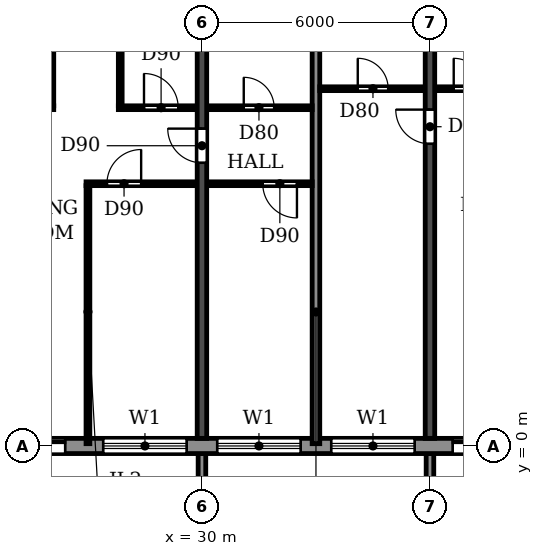
"""IFC4 building model, lengths in metres.
Left out: names, types, materials, properties, quantities, classifications, styles, units other than length and angle.
Written with IfcOpenShell. Run it as: python <this file> out.ifc"""

import sys

from ifc_helpers import new_model, si_unit, direction, frame, frame_2d, origin, place, context, subcontext, project, spatial, polyline, rectangle, outline, extrude, source, transform, mapped, element, fill, save


model = new_model("IFC4")
c1 = context("Model", 3, precision=1e-05, world=origin(), true_north=direction((0.0, 1.0)))
c2 = subcontext(c1, "Body", "Model", "MODEL_VIEW")
j1 = project(units=[si_unit("LENGTHUNIT", "METRE"), si_unit("PLANEANGLEUNIT", "RADIAN")], contexts=[c1])
p1 = place(None, origin())
s1 = spatial("IfcSite", under=j1, at=p1, CompositionType="ELEMENT")
p2 = place(p1, origin())
s2 = spatial("IfcBuilding", under=s1, at=p2, CompositionType="ELEMENT")
p3 = place(p2, frame((0.0, 0.0, 208.2)))
s3 = spatial("IfcBuildingStorey", under=s2, at=p3, CompositionType="ELEMENT", Elevation=208.2)
p4 = place(p3, frame((30.0, 0.2, 0.0), z_axis=(0.0, 0.0, 1.0), x_axis=(0.0, 1.0, 0.0)))
e1 = element("IfcWall", 1, at=p4, inside=s3, PredefinedType="SHEAR", context=c2, shape_type="SweptSolid", body=[
    extrude(rectangle(XDim=11.7, YDim=0.25, at=frame_2d((5.85, 0.0))), origin(), (0.0, 0.0, 1.0), 3.0),
])
p5 = place(p4, frame((7.25, 0.0, 0.0)))
e2 = element("IfcOpeningElement", 2, at=p5, cuts=e1, PredefinedType="OPENING", context=c2, shape_type="SweptSolid", body=[
    extrude(rectangle(XDim=0.9, YDim=2.1, at=frame_2d((0.45, 1.05))), frame((0.0, 0.135, 0.0), z_axis=(0.0, -1.0, 0.0), x_axis=(1.0, 0.0, 0.0)), (0.0, 0.0, 1.0), 0.27),
])
p6 = place(p3, frame((36.0, 0.2, 0.0), z_axis=(0.0, 0.0, 1.0), x_axis=(0.0, 1.0, 0.0)))
e3 = element("IfcWall", 3, at=p6, inside=s3, PredefinedType="SHEAR", context=c2, shape_type="SweptSolid", body=[
    extrude(rectangle(XDim=11.7, YDim=0.25, at=frame_2d((5.85, 0.0))), origin(), (0.0, 0.0, 1.0), 3.0),
])
p7 = place(p6, frame((7.75, 0.0, 0.0)))
e4 = element("IfcOpeningElement", 4, at=p7, cuts=e3, PredefinedType="OPENING", context=c2, shape_type="SweptSolid", body=[
    extrude(rectangle(XDim=0.9, YDim=2.1, at=frame_2d((0.45, 1.05))), frame((0.0, 0.135, 0.0), z_axis=(0.0, -1.0, 0.0), x_axis=(1.0, 0.0, 0.0)), (0.0, 0.0, 1.0), 0.27),
])
p8 = place(p3, frame((22.683, 0.0, 0.0), z_axis=(0.0, 0.0, 1.0), x_axis=(1.0, 0.0, 0.0)))
e5 = element("IfcWall", 5, at=p8, inside=s3, PredefinedType="STANDARD", context=c2, shape_type="SweptSolid", body=[
    extrude(rectangle(XDim=56.634, YDim=0.4, at=frame_2d((28.317, 0.0))), origin(), (0.0, 0.0, 1.0), 3.0),
])
p9 = place(p8, frame((1.917, 0.0, 0.0)))
e6 = element("IfcOpeningElement", 6, at=p9, cuts=e5, PredefinedType="OPENING", context=c2, shape_type="SweptSolid", body=[
    extrude(rectangle(XDim=1.8, YDim=2.4, at=frame_2d((0.9, 1.2))), frame((0.0, 0.21, 0.0), z_axis=(0.0, -1.0, 0.0), x_axis=(1.0, 0.0, 0.0)), (0.0, 0.0, 1.0), 0.42),
])
p10 = place(p8, frame((4.717, 0.0, 0.9)))
e7 = element("IfcOpeningElement", 7, at=p10, cuts=e5, PredefinedType="OPENING", context=c2, shape_type="SweptSolid", body=[
    extrude(rectangle(XDim=2.2, YDim=1.5, at=frame_2d((1.1, 0.75))), frame((0.0, 0.21, 0.0), z_axis=(0.0, -1.0, 0.0), x_axis=(1.0, 0.0, 0.0)), (0.0, 0.0, 1.0), 0.42),
])
p11 = place(p8, frame((7.717, 0.0, 0.9)))
e8 = element("IfcOpeningElement", 8, at=p11, cuts=e5, PredefinedType="OPENING", context=c2, shape_type="SweptSolid", body=[
    extrude(rectangle(XDim=2.2, YDim=1.5, at=frame_2d((1.1, 0.75))), frame((0.0, 0.21, 0.0), z_axis=(0.0, -1.0, 0.0), x_axis=(1.0, 0.0, 0.0)), (0.0, 0.0, 1.0), 0.42),
])
p12 = place(p8, frame((10.717, 0.0, 0.9)))
e9 = element("IfcOpeningElement", 9, at=p12, cuts=e5, PredefinedType="OPENING", context=c2, shape_type="SweptSolid", body=[
    extrude(rectangle(XDim=2.2, YDim=1.5, at=frame_2d((1.1, 0.75))), frame((0.0, 0.21, 0.0), z_axis=(0.0, -1.0, 0.0), x_axis=(1.0, 0.0, 0.0)), (0.0, 0.0, 1.0), 0.42),
])
p13 = place(p8, frame((13.917, 0.0, 0.0)))
e10 = element("IfcOpeningElement", 10, at=p13, cuts=e5, PredefinedType="OPENING", context=c2, shape_type="SweptSolid", body=[
    extrude(rectangle(XDim=1.8, YDim=2.4, at=frame_2d((0.9, 1.2))), frame((0.0, 0.21, 0.0), z_axis=(0.0, -1.0, 0.0), x_axis=(1.0, 0.0, 0.0)), (0.0, 0.0, 1.0), 0.42),
])
p14 = place(p8, frame((16.717, 0.0, 0.9)))
e11 = element("IfcOpeningElement", 11, at=p14, cuts=e5, PredefinedType="OPENING", context=c2, shape_type="SweptSolid", body=[
    extrude(rectangle(XDim=2.2, YDim=1.5, at=frame_2d((1.1, 0.75))), frame((0.0, 0.21, 0.0), z_axis=(0.0, -1.0, 0.0), x_axis=(1.0, 0.0, 0.0)), (0.0, 0.0, 1.0), 0.42),
])
p15 = place(p8, frame((19.717, 0.0, 0.9)))
e12 = element("IfcOpeningElement", 12, at=p15, cuts=e5, PredefinedType="OPENING", context=c2, shape_type="SweptSolid", body=[
    extrude(rectangle(XDim=2.2, YDim=1.5, at=frame_2d((1.1, 0.75))), frame((0.0, 0.21, 0.0), z_axis=(0.0, -1.0, 0.0), x_axis=(1.0, 0.0, 0.0)), (0.0, 0.0, 1.0), 0.42),
])
p16 = place(p8, frame((22.717, 0.0, 0.9)))
e13 = element("IfcOpeningElement", 13, at=p16, cuts=e5, PredefinedType="OPENING", context=c2, shape_type="SweptSolid", body=[
    extrude(rectangle(XDim=2.2, YDim=1.5, at=frame_2d((1.1, 0.75))), frame((0.0, 0.21, 0.0), z_axis=(0.0, -1.0, 0.0), x_axis=(1.0, 0.0, 0.0)), (0.0, 0.0, 1.0), 0.42),
])
p17 = place(p8, frame((25.917, 0.0, 0.0)))
e14 = element("IfcOpeningElement", 14, at=p17, cuts=e5, PredefinedType="OPENING", context=c2, shape_type="SweptSolid", body=[
    extrude(rectangle(XDim=1.8, YDim=2.4, at=frame_2d((0.9, 1.2))), frame((0.0, 0.21, 0.0), z_axis=(0.0, -1.0, 0.0), x_axis=(1.0, 0.0, 0.0)), (0.0, 0.0, 1.0), 0.42),
])
p18 = place(p8, frame((28.717, 0.0, 0.9)))
e15 = element("IfcOpeningElement", 15, at=p18, cuts=e5, PredefinedType="OPENING", context=c2, shape_type="SweptSolid", body=[
    extrude(rectangle(XDim=2.2, YDim=1.5, at=frame_2d((1.1, 0.75))), frame((0.0, 0.21, 0.0), z_axis=(0.0, -1.0, 0.0), x_axis=(1.0, 0.0, 0.0)), (0.0, 0.0, 1.0), 0.42),
])
p19 = place(p8, frame((31.717, 0.0, 0.9)))
e16 = element("IfcOpeningElement", 16, at=p19, cuts=e5, PredefinedType="OPENING", context=c2, shape_type="SweptSolid", body=[
    extrude(rectangle(XDim=2.2, YDim=1.5, at=frame_2d((1.1, 0.75))), frame((0.0, 0.21, 0.0), z_axis=(0.0, -1.0, 0.0), x_axis=(1.0, 0.0, 0.0)), (0.0, 0.0, 1.0), 0.42),
])
p20 = place(p8, frame((34.717, 0.0, 0.9)))
e17 = element("IfcOpeningElement", 17, at=p20, cuts=e5, PredefinedType="OPENING", context=c2, shape_type="SweptSolid", body=[
    extrude(rectangle(XDim=2.2, YDim=1.5, at=frame_2d((1.1, 0.75))), frame((0.0, 0.21, 0.0), z_axis=(0.0, -1.0, 0.0), x_axis=(1.0, 0.0, 0.0)), (0.0, 0.0, 1.0), 0.42),
])
p21 = place(p8, frame((37.717, 0.0, 0.9)))
e18 = element("IfcOpeningElement", 18, at=p21, cuts=e5, PredefinedType="OPENING", context=c2, shape_type="SweptSolid", body=[
    extrude(rectangle(XDim=2.2, YDim=1.5, at=frame_2d((1.1, 0.75))), frame((0.0, 0.21, 0.0), z_axis=(0.0, -1.0, 0.0), x_axis=(1.0, 0.0, 0.0)), (0.0, 0.0, 1.0), 0.42),
])
p22 = place(p8, frame((40.717, 0.0, 0.9)))
e19 = element("IfcOpeningElement", 19, at=p22, cuts=e5, PredefinedType="OPENING", context=c2, shape_type="SweptSolid", body=[
    extrude(rectangle(XDim=2.2, YDim=1.5, at=frame_2d((1.1, 0.75))), frame((0.0, 0.21, 0.0), z_axis=(0.0, -1.0, 0.0), x_axis=(1.0, 0.0, 0.0)), (0.0, 0.0, 1.0), 0.42),
])
p23 = place(p8, frame((43.717, 0.0, 0.9)))
e20 = element("IfcOpeningElement", 20, at=p23, cuts=e5, PredefinedType="OPENING", context=c2, shape_type="SweptSolid", body=[
    extrude(rectangle(XDim=2.2, YDim=1.5, at=frame_2d((1.1, 0.75))), frame((0.0, 0.21, 0.0), z_axis=(0.0, -1.0, 0.0), x_axis=(1.0, 0.0, 0.0)), (0.0, 0.0, 1.0), 0.42),
])
p24 = place(p8, frame((46.717, 0.0, 0.9)))
e21 = element("IfcOpeningElement", 21, at=p24, cuts=e5, PredefinedType="OPENING", context=c2, shape_type="SweptSolid", body=[
    extrude(rectangle(XDim=2.2, YDim=1.5, at=frame_2d((1.1, 0.75))), frame((0.0, 0.21, 0.0), z_axis=(0.0, -1.0, 0.0), x_axis=(1.0, 0.0, 0.0)), (0.0, 0.0, 1.0), 0.42),
])
p25 = place(p8, frame((49.717, 0.0, 0.9)))
e22 = element("IfcOpeningElement", 22, at=p25, cuts=e5, PredefinedType="OPENING", context=c2, shape_type="SweptSolid", body=[
    extrude(rectangle(XDim=2.2, YDim=1.5, at=frame_2d((1.1, 0.75))), frame((0.0, 0.21, 0.0), z_axis=(0.0, -1.0, 0.0), x_axis=(1.0, 0.0, 0.0)), (0.0, 0.0, 1.0), 0.42),
])
p26 = place(p8, frame((52.917, 0.0, 0.0)))
e23 = element("IfcOpeningElement", 23, at=p26, cuts=e5, PredefinedType="OPENING", context=c2, shape_type="SweptSolid", body=[
    extrude(rectangle(XDim=1.8, YDim=2.4, at=frame_2d((0.9, 1.2))), frame((0.0, 0.21, 0.0), z_axis=(0.0, -1.0, 0.0), x_axis=(1.0, 0.0, 0.0)), (0.0, 0.0, 1.0), 0.42),
])
m1 = source(origin(), c2, "Body", "SweptSolid", [
    extrude(outline(polyline([(0.0, 0.0), (0.2, 0.0), (0.2, 1.65), (0.0, 1.65), (0.0, 0.0)])), origin(), (0.0, 0.0, 1.0), 3.1),
])
for number, where in (
    (24, (29.9, -1.85, 0.0)),
    (25, (35.9, -1.85, 0.0)),
):
    element("IfcWall", number, at=place(p3, frame(where)), inside=s3, PredefinedType="STANDARD", context=c2, shape_type="MappedRepresentation", body=[
        mapped(m1, transform((0.0, 0.0, 0.0))),
    ])
p27 = place(p3, frame((33.0, 0.06, 0.0), z_axis=(0.0, 0.0, 1.0), x_axis=(0.0, 1.0, 0.0)))
e26 = element("IfcWall", 26, at=p27, inside=s3, PredefinedType="PARTITIONING", context=c2, shape_type="SweptSolid", body=[
    extrude(rectangle(XDim=11.83, YDim=0.2, at=frame_2d((5.915, 0.0))), origin(), (0.0, 0.0, 1.0), 3.0),
])
p28 = place(p3, frame((26.95, 6.9, 0.0), z_axis=(0.0, 0.0, 1.0), x_axis=(1.0, 0.0, 0.0)))
e27 = element("IfcWall", 27, at=p28, inside=s3, PredefinedType="PARTITIONING", context=c2, shape_type="SweptSolid", body=[
    extrude(rectangle(XDim=2.915, YDim=0.1, at=frame_2d((1.458, 0.0))), origin(), (0.0, 0.0, 1.0), 3.0),
])
p29 = place(p28, frame((0.55, 0.0, 0.0)))
e28 = element("IfcOpeningElement", 28, at=p29, cuts=e27, PredefinedType="OPENING", context=c2, shape_type="SweptSolid", body=[
    extrude(rectangle(XDim=0.9, YDim=2.1, at=frame_2d((0.45, 1.05))), frame((0.0, 0.06, 0.0), z_axis=(0.0, -1.0, 0.0), x_axis=(1.0, 0.0, 0.0)), (0.0, 0.0, 1.0), 0.12),
])
p30 = place(p3, frame((30.135, 6.9, 0.0), z_axis=(0.0, 0.0, 1.0), x_axis=(1.0, 0.0, 0.0)))
e29 = element("IfcWall", 29, at=p30, inside=s3, PredefinedType="PARTITIONING", context=c2, shape_type="SweptSolid", body=[
    extrude(rectangle(XDim=2.765, YDim=0.1, at=frame_2d((1.382, 0.0))), origin(), (0.0, 0.0, 1.0), 3.0),
])
p31 = place(p30, frame((1.465, 0.0, 0.0)))
e30 = element("IfcOpeningElement", 30, at=p31, cuts=e29, PredefinedType="OPENING", context=c2, shape_type="SweptSolid", body=[
    extrude(rectangle(XDim=0.9, YDim=2.1, at=frame_2d((0.45, 1.05))), frame((0.0, 0.06, 0.0), z_axis=(0.0, -1.0, 0.0), x_axis=(1.0, 0.0, 0.0)), (0.0, 0.0, 1.0), 0.12),
])
p32 = place(p3, frame((24.135, 8.9, 0.0), z_axis=(0.0, 0.0, 1.0), x_axis=(1.0, 0.0, 0.0)))
e31 = element("IfcWall", 31, at=p32, inside=s3, PredefinedType="PARTITIONING", context=c2, shape_type="SweptSolid", body=[
    extrude(rectangle(XDim=1.965, YDim=0.1, at=frame_2d((0.982, 0.0))), origin(), (0.0, 0.0, 1.0), 3.0),
])
p33 = place(p32, frame((0.49, 0.0, 0.0)))
e32 = element("IfcOpeningElement", 32, at=p33, cuts=e31, PredefinedType="OPENING", context=c2, shape_type="SweptSolid", body=[
    extrude(rectangle(XDim=0.8, YDim=2.1, at=frame_2d((0.4, 1.05))), frame((0.0, 0.06, 0.0), z_axis=(0.0, -1.0, 0.0), x_axis=(1.0, 0.0, 0.0)), (0.0, 0.0, 1.0), 0.12),
])
p34 = place(p3, frame((27.8, 8.9, 0.0), z_axis=(0.0, 0.0, 1.0), x_axis=(1.0, 0.0, 0.0)))
e33 = element("IfcWall", 33, at=p34, inside=s3, PredefinedType="PARTITIONING", context=c2, shape_type="SweptSolid", body=[
    extrude(rectangle(XDim=2.065, YDim=0.1, at=frame_2d((1.032, 0.0))), origin(), (0.0, 0.0, 1.0), 3.0),
])
p35 = place(p34, frame((0.675, 0.0, 0.0)))
e34 = element("IfcOpeningElement", 34, at=p35, cuts=e33, PredefinedType="OPENING", context=c2, shape_type="SweptSolid", body=[
    extrude(rectangle(XDim=0.9, YDim=2.1, at=frame_2d((0.45, 1.05))), frame((0.0, 0.06, 0.0), z_axis=(0.0, -1.0, 0.0), x_axis=(1.0, 0.0, 0.0)), (0.0, 0.0, 1.0), 0.12),
])
p36 = place(p3, frame((30.135, 8.9, 0.0), z_axis=(0.0, 0.0, 1.0), x_axis=(1.0, 0.0, 0.0)))
e35 = element("IfcWall", 35, at=p36, inside=s3, PredefinedType="PARTITIONING", context=c2, shape_type="SweptSolid", body=[
    extrude(rectangle(XDim=2.765, YDim=0.1, at=frame_2d((1.382, 0.0))), origin(), (0.0, 0.0, 1.0), 3.0),
])
p37 = place(p36, frame((0.965, 0.0, 0.0)))
e36 = element("IfcOpeningElement", 36, at=p37, cuts=e35, PredefinedType="OPENING", context=c2, shape_type="SweptSolid", body=[
    extrude(rectangle(XDim=0.8, YDim=2.1, at=frame_2d((0.4, 1.05))), frame((0.0, 0.06, 0.0), z_axis=(0.0, -1.0, 0.0), x_axis=(1.0, 0.0, 0.0)), (0.0, 0.0, 1.0), 0.12),
])
p38 = place(p3, frame((33.1, 9.4, 0.0), z_axis=(0.0, 0.0, 1.0), x_axis=(1.0, 0.0, 0.0)))
e37 = element("IfcWall", 37, at=p38, inside=s3, PredefinedType="PARTITIONING", context=c2, shape_type="SweptSolid", body=[
    extrude(rectangle(XDim=2.765, YDim=0.1, at=frame_2d((1.382, 0.0))), origin(), (0.0, 0.0, 1.0), 3.0),
])
p39 = place(p38, frame((1.0, 0.0, 0.0)))
e38 = element("IfcOpeningElement", 38, at=p39, cuts=e37, PredefinedType="OPENING", context=c2, shape_type="SweptSolid", body=[
    extrude(rectangle(XDim=0.8, YDim=2.1, at=frame_2d((0.4, 1.05))), frame((0.0, 0.06, 0.0), z_axis=(0.0, -1.0, 0.0), x_axis=(1.0, 0.0, 0.0)), (0.0, 0.0, 1.0), 0.12),
])
p40 = place(p3, frame((36.135, 9.4, 0.0), z_axis=(0.0, 0.0, 1.0), x_axis=(1.0, 0.0, 0.0)))
e39 = element("IfcWall", 39, at=p40, inside=s3, PredefinedType="PARTITIONING", context=c2, shape_type="SweptSolid", body=[
    extrude(rectangle(XDim=1.965, YDim=0.1, at=frame_2d((0.982, 0.0))), origin(), (0.0, 0.0, 1.0), 3.0),
])
p41 = place(p40, frame((0.49, 0.0, 0.0)))
e40 = element("IfcOpeningElement", 40, at=p41, cuts=e39, PredefinedType="OPENING", context=c2, shape_type="SweptSolid", body=[
    extrude(rectangle(XDim=0.8, YDim=2.1, at=frame_2d((0.4, 1.05))), frame((0.0, 0.06, 0.0), z_axis=(0.0, -1.0, 0.0), x_axis=(1.0, 0.0, 0.0)), (0.0, 0.0, 1.0), 0.12),
])
p42 = place(p3, frame((26.05, 8.95, 0.0), z_axis=(0.0, 0.0, 1.0), x_axis=(0.0, 1.0, 0.0)))
e41 = element("IfcWall", 41, at=p42, inside=s3, PredefinedType="PARTITIONING", context=c2, shape_type="SweptSolid", body=[
    extrude(rectangle(XDim=2.94, YDim=0.1, at=frame_2d((1.47, 0.0))), origin(), (0.0, 0.0, 1.0), 3.0),
])
p43 = place(p3, frame((27.0, 0.06, 0.0), z_axis=(0.0, 0.0, 1.0), x_axis=(0.0, 1.0, 0.0)))
e42 = element("IfcWall", 42, at=p43, inside=s3, PredefinedType="PARTITIONING", context=c2, shape_type="SweptSolid", body=[
    extrude(rectangle(XDim=6.79, YDim=0.1, at=frame_2d((3.395, 0.0))), origin(), (0.0, 0.0, 1.0), 3.0),
])
p44 = place(p3, frame((27.85, 8.95, 0.0), z_axis=(0.0, 0.0, 1.0), x_axis=(0.0, 1.0, 0.0)))
e43 = element("IfcWall", 43, at=p44, inside=s3, PredefinedType="PARTITIONING", context=c2, shape_type="SweptSolid", body=[
    extrude(rectangle(XDim=2.94, YDim=0.1, at=frame_2d((1.47, 0.0))), origin(), (0.0, 0.0, 1.0), 3.0),
])
p45 = place(p9, origin())
e44 = element("IfcDoor", 44, at=p45, inside=s3, OperationType="DOUBLE_DOOR_SLIDING", PredefinedType="DOOR", context=c2, shape_type="SweptSolid", body=[
    extrude(rectangle(XDim=1.8, YDim=2.4, at=frame_2d((0.9, 1.2))), frame((0.0, 0.025, 0.0), z_axis=(0.0, -1.0, 0.0), x_axis=(1.0, 0.0, 0.0)), (0.0, 0.0, 1.0), 0.05),
])
fill(e6, e44)
p46 = place(p10, origin())
e45 = element("IfcWindow", 45, at=p46, inside=s3, PartitioningType="DOUBLE_PANEL_HORIZONTAL", PredefinedType="WINDOW", context=c2, shape_type="SweptSolid", body=[
    extrude(rectangle(XDim=2.2, YDim=1.5, at=frame_2d((1.1, 0.75))), frame((0.0, 0.03, 0.0), z_axis=(0.0, -1.0, 0.0), x_axis=(1.0, 0.0, 0.0)), (0.0, 0.0, 1.0), 0.06),
])
fill(e7, e45)
p47 = place(p11, origin())
e46 = element("IfcWindow", 46, at=p47, inside=s3, PartitioningType="DOUBLE_PANEL_HORIZONTAL", PredefinedType="WINDOW", context=c2, shape_type="SweptSolid", body=[
    extrude(rectangle(XDim=2.2, YDim=1.5, at=frame_2d((1.1, 0.75))), frame((0.0, 0.03, 0.0), z_axis=(0.0, -1.0, 0.0), x_axis=(1.0, 0.0, 0.0)), (0.0, 0.0, 1.0), 0.06),
])
fill(e8, e46)
p48 = place(p12, origin())
e47 = element("IfcWindow", 47, at=p48, inside=s3, PartitioningType="DOUBLE_PANEL_HORIZONTAL", PredefinedType="WINDOW", context=c2, shape_type="SweptSolid", body=[
    extrude(rectangle(XDim=2.2, YDim=1.5, at=frame_2d((1.1, 0.75))), frame((0.0, 0.03, 0.0), z_axis=(0.0, -1.0, 0.0), x_axis=(1.0, 0.0, 0.0)), (0.0, 0.0, 1.0), 0.06),
])
fill(e9, e47)
p49 = place(p13, origin())
e48 = element("IfcDoor", 48, at=p49, inside=s3, OperationType="DOUBLE_DOOR_SLIDING", PredefinedType="DOOR", context=c2, shape_type="SweptSolid", body=[
    extrude(rectangle(XDim=1.8, YDim=2.4, at=frame_2d((0.9, 1.2))), frame((0.0, 0.025, 0.0), z_axis=(0.0, -1.0, 0.0), x_axis=(1.0, 0.0, 0.0)), (0.0, 0.0, 1.0), 0.05),
])
fill(e10, e48)
p50 = place(p37, origin())
e49 = element("IfcDoor", 49, at=p50, inside=s3, OperationType="SINGLE_SWING_LEFT", PredefinedType="DOOR", context=c2, shape_type="SweptSolid", body=[
    extrude(rectangle(XDim=0.8, YDim=2.1, at=frame_2d((0.4, 1.05))), frame((0.0, 0.025, 0.0), z_axis=(0.0, -1.0, 0.0), x_axis=(1.0, 0.0, 0.0)), (0.0, 0.0, 1.0), 0.05),
])
fill(e36, e49)
p51 = place(p31, frame((0.9, 0.0, 0.0), z_axis=(0.0, 0.0, 1.0), x_axis=(-1.0, 0.0, 0.0)))
e50 = element("IfcDoor", 50, at=p51, inside=s3, OperationType="SINGLE_SWING_LEFT", PredefinedType="DOOR", context=c2, shape_type="SweptSolid", body=[
    extrude(rectangle(XDim=0.9, YDim=2.1, at=frame_2d((0.45, 1.05))), frame((0.0, 0.025, 0.0), z_axis=(0.0, -1.0, 0.0), x_axis=(1.0, 0.0, 0.0)), (0.0, 0.0, 1.0), 0.05),
])
fill(e30, e50)
p52 = place(p29, origin())
e51 = element("IfcDoor", 51, at=p52, inside=s3, OperationType="SINGLE_SWING_RIGHT", PredefinedType="DOOR", context=c2, shape_type="SweptSolid", body=[
    extrude(rectangle(XDim=0.9, YDim=2.1, at=frame_2d((0.45, 1.05))), frame((0.0, 0.025, 0.0), z_axis=(0.0, -1.0, 0.0), x_axis=(1.0, 0.0, 0.0)), (0.0, 0.0, 1.0), 0.05),
])
fill(e28, e51)
p53 = place(p35, origin())
e52 = element("IfcDoor", 52, at=p53, inside=s3, OperationType="SINGLE_SWING_LEFT", PredefinedType="DOOR", context=c2, shape_type="SweptSolid", body=[
    extrude(rectangle(XDim=0.9, YDim=2.1, at=frame_2d((0.45, 1.05))), frame((0.0, 0.025, 0.0), z_axis=(0.0, -1.0, 0.0), x_axis=(1.0, 0.0, 0.0)), (0.0, 0.0, 1.0), 0.05),
])
fill(e34, e52)
p54 = place(p5, origin())
e53 = element("IfcDoor", 53, at=p54, inside=s3, OperationType="SINGLE_SWING_RIGHT", PredefinedType="DOOR", context=c2, shape_type="SweptSolid", body=[
    extrude(rectangle(XDim=0.9, YDim=2.1, at=frame_2d((0.45, 1.05))), frame((0.0, 0.025, 0.0), z_axis=(0.0, -1.0, 0.0), x_axis=(1.0, 0.0, 0.0)), (0.0, 0.0, 1.0), 0.05),
])
fill(e2, e53)
p55 = place(p39, origin())
e54 = element("IfcDoor", 54, at=p55, inside=s3, OperationType="SINGLE_SWING_LEFT", PredefinedType="DOOR", context=c2, shape_type="SweptSolid", body=[
    extrude(rectangle(XDim=0.8, YDim=2.1, at=frame_2d((0.4, 1.05))), frame((0.0, 0.025, 0.0), z_axis=(0.0, -1.0, 0.0), x_axis=(1.0, 0.0, 0.0)), (0.0, 0.0, 1.0), 0.05),
])
fill(e38, e54)
p56 = place(p7, origin())
e55 = element("IfcDoor", 55, at=p56, inside=s3, OperationType="SINGLE_SWING_RIGHT", PredefinedType="DOOR", context=c2, shape_type="SweptSolid", body=[
    extrude(rectangle(XDim=0.9, YDim=2.1, at=frame_2d((0.45, 1.05))), frame((0.0, 0.025, 0.0), z_axis=(0.0, -1.0, 0.0), x_axis=(1.0, 0.0, 0.0)), (0.0, 0.0, 1.0), 0.05),
])
fill(e4, e55)
p57 = place(p41, origin())
e56 = element("IfcDoor", 56, at=p57, inside=s3, OperationType="SINGLE_SWING_LEFT", PredefinedType="DOOR", context=c2, shape_type="SweptSolid", body=[
    extrude(rectangle(XDim=0.8, YDim=2.1, at=frame_2d((0.4, 1.05))), frame((0.0, 0.025, 0.0), z_axis=(0.0, -1.0, 0.0), x_axis=(1.0, 0.0, 0.0)), (0.0, 0.0, 1.0), 0.05),
])
fill(e40, e56)
save(model, sys.argv[1])
